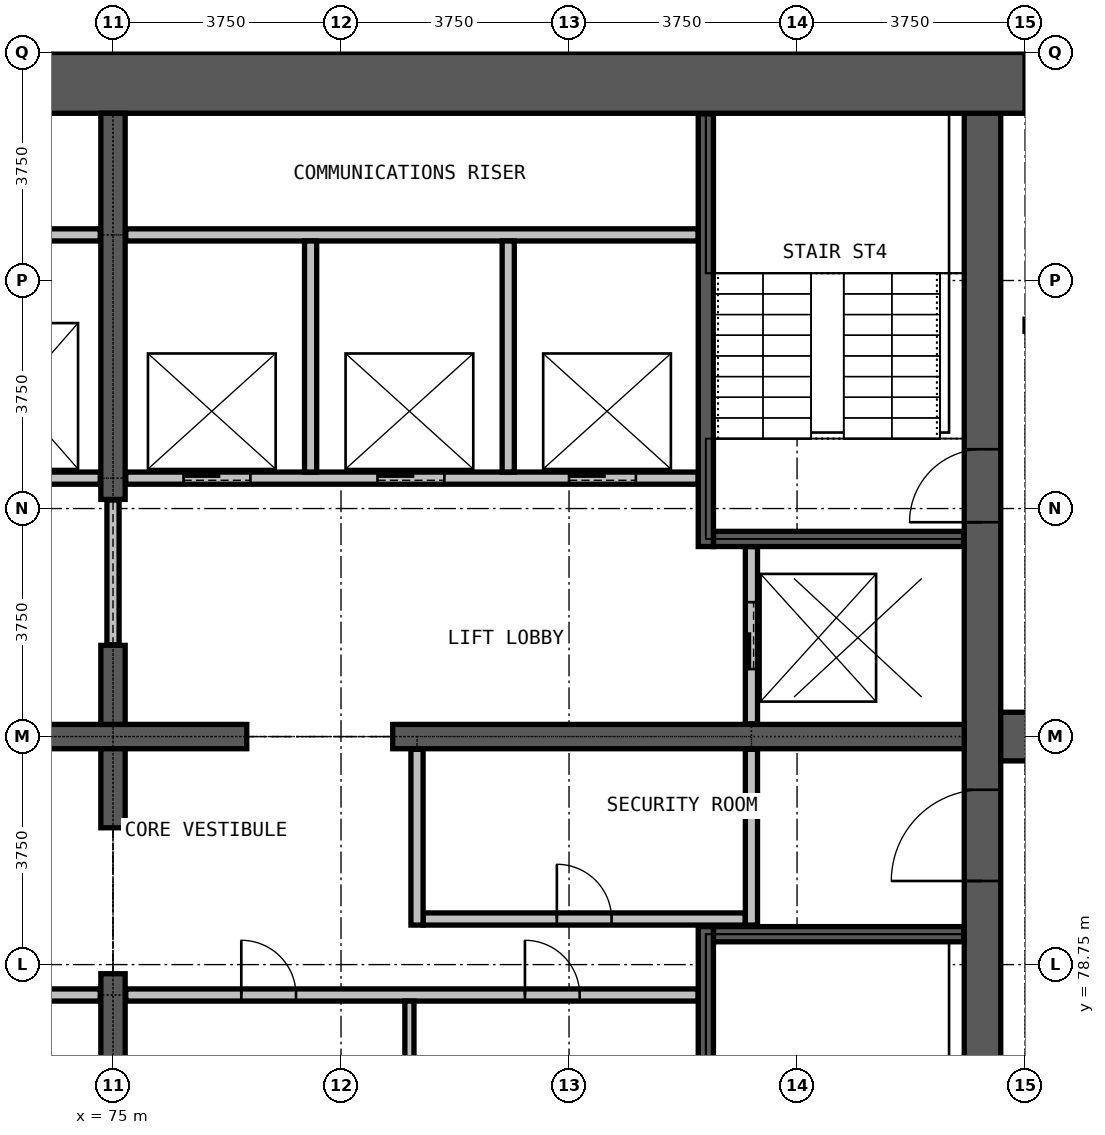
"""IFC4 building model, lengths in metres.
Left out: names, types, materials, properties, quantities, classifications, styles, units other than length and angle.
Written with IfcOpenShell. Run it as: python <this file> out.ifc"""

import sys

from ifc_helpers import new_model, si_unit, direction, frame, frame_2d, origin, place, context, subcontext, project, spatial, rectangle, extrude, element, fill, save


model = new_model("IFC4")
c1 = context("Model", 3, precision=1e-05, world=origin(), true_north=direction((0.0, 1.0)))
c2 = subcontext(c1, "Body", "Model", "MODEL_VIEW")
j1 = project(units=[si_unit("LENGTHUNIT", "METRE"), si_unit("PLANEANGLEUNIT", "RADIAN")], contexts=[c1])
p1 = place(None, origin())
s1 = spatial("IfcSite", under=j1, at=p1, CompositionType="ELEMENT")
p2 = place(p1, origin())
s2 = spatial("IfcBuilding", under=s1, at=p2, CompositionType="ELEMENT")
p3 = place(p2, frame((0.0, 0.0, 183.7)))
s3 = spatial("IfcBuildingStorey", under=s2, at=p3, CompositionType="ELEMENT", Elevation=183.7)
p4 = place(p3, frame((89.3, 72.25, 0.0), z_axis=(0.0, 0.0, 1.0), x_axis=(0.0, 1.0, 0.0)))
e1 = element("IfcWall", 1, at=p4, inside=s3, PredefinedType="SHEAR", context=c2, shape_type="SweptSolid", body=[
    extrude(rectangle(XDim=20.5, YDim=0.6, at=frame_2d((10.25, 0.0))), origin(), (0.0, 0.0, 1.0), 5.0),
])
p5 = place(p4, frame((0.275, 0.0, 0.0)))
e2 = element("IfcOpeningElement", 2, at=p5, cuts=e1, PredefinedType="OPENING", context=c2, shape_type="SweptSolid", body=[
    extrude(rectangle(XDim=1.2, YDim=2.2, at=frame_2d((0.6, 1.1))), frame((0.0, 0.31, 0.0), z_axis=(0.0, -1.0, 0.0), x_axis=(1.0, 0.0, 0.0)), (0.0, 0.0, 1.0), 0.62),
])
p6 = place(p4, frame((13.775, 0.0, 0.0)))
e3 = element("IfcOpeningElement", 3, at=p6, cuts=e1, PredefinedType="OPENING", context=c2, shape_type="SweptSolid", body=[
    extrude(rectangle(XDim=1.2, YDim=2.2, at=frame_2d((0.6, 1.1))), frame((0.0, 0.31, 0.0), z_axis=(0.0, -1.0, 0.0), x_axis=(1.0, 0.0, 0.0)), (0.0, 0.0, 1.0), 0.62),
])
p7 = place(p4, frame((7.875, 0.0, 0.0)))
e4 = element("IfcOpeningElement", 4, at=p7, cuts=e1, PredefinedType="OPENING", context=c2, shape_type="SweptSolid", body=[
    extrude(rectangle(XDim=1.5, YDim=2.2, at=frame_2d((0.75, 1.1))), frame((0.0, 0.31, 0.0), z_axis=(0.0, -1.0, 0.0), x_axis=(1.0, 0.0, 0.0)), (0.0, 0.0, 1.0), 0.62),
])
p8 = place(p3, frame((90.0, 93.25, 0.0), z_axis=(0.0, 0.0, 1.0), x_axis=(-1.0, 0.0, 0.0)))
e5 = element("IfcWall", 5, at=p8, inside=s3, PredefinedType="SHEAR", context=c2, shape_type="SweptSolid", body=[
    extrude(rectangle(XDim=30.0, YDim=1.0, at=frame_2d((15.0, 0.0))), origin(), (0.0, 0.0, 1.0), 5.0),
])
p9 = place(p3, frame((72.8, 82.5, 0.0), z_axis=(0.0, 0.0, 1.0), x_axis=(1.0, 0.0, 0.0)))
e6 = element("IfcWall", 6, at=p9, inside=s3, PredefinedType="SHEAR", context=c2, shape_type="SweptSolid", body=[
    extrude(rectangle(XDim=4.4, YDim=0.4, at=frame_2d((2.2, 0.0))), origin(), (0.0, 0.0, 1.0), 5.0),
])
p10 = place(p3, frame((79.6, 82.5, 0.0), z_axis=(0.0, 0.0, 1.0), x_axis=(1.0, 0.0, 0.0)))
e7 = element("IfcWall", 7, at=p10, inside=s3, PredefinedType="SHEAR", context=c2, shape_type="SweptSolid", body=[
    extrude(rectangle(XDim=9.4, YDim=0.4, at=frame_2d((4.7, 0.0))), origin(), (0.0, 0.0, 1.0), 5.0),
])
p11 = place(p3, frame((75.0, 72.25, 0.0), z_axis=(0.0, 0.0, 1.0), x_axis=(0.0, 1.0, 0.0)))
e8 = element("IfcWall", 8, at=p11, inside=s3, PredefinedType="SHEAR", context=c2, shape_type="SweptSolid", body=[
    extrude(rectangle(XDim=6.35, YDim=0.4, at=frame_2d((3.175, 0.0))), origin(), (0.0, 0.0, 1.0), 5.0),
])
for number, where, z_axis, x_axis in (
    (9, (75.0, 81.0, 0.0), (0.0, 0.0, 1.0), (0.0, 1.0, 0.0)),
    (10, (75.0, 82.7, 0.0), (0.0, 0.0, 1.0), (0.0, 1.0, 0.0)),
):
    element("IfcWall", number, at=place(p3, frame(where, z_axis=z_axis, x_axis=x_axis)), inside=s3, PredefinedType="SHEAR", context=c2, shape_type="SweptSolid", body=[
        extrude(rectangle(XDim=1.3, YDim=0.4, at=frame_2d((0.65, 0.0))), origin(), (0.0, 0.0, 1.0), 5.0),
    ])
p12 = place(p3, frame((75.0, 86.4, 0.0), z_axis=(0.0, 0.0, 1.0), x_axis=(0.0, 1.0, 0.0)))
e11 = element("IfcWall", 11, at=p12, inside=s3, PredefinedType="SHEAR", context=c2, shape_type="SweptSolid", body=[
    extrude(rectangle(XDim=6.35, YDim=0.4, at=frame_2d((3.175, 0.0))), origin(), (0.0, 0.0, 1.0), 5.0),
])
p13 = place(p3, frame((89.6, 82.5, 0.0), z_axis=(0.0, 0.0, 1.0), x_axis=(1.0, 0.0, 0.0)))
e12 = element("IfcWall", 12, at=p13, inside=s3, PredefinedType="SHEAR", context=c2, shape_type="SweptSolid", body=[
    extrude(rectangle(XDim=2.5, YDim=0.8, at=frame_2d((1.25, 0.0))), origin(), (0.0, 0.0, 1.0), 4.7),
])
p14 = place(p3, frame((65.375, 78.25, 0.0), z_axis=(0.0, 0.0, 1.0), x_axis=(1.0, 0.0, 0.0)))
e13 = element("IfcWall", 13, at=p14, inside=s3, PredefinedType="PARTITIONING", context=c2, shape_type="SweptSolid", body=[
    extrude(rectangle(XDim=9.415, YDim=0.2, at=frame_2d((4.708, 0.0))), origin(), (0.0, 0.0, 1.0), 4.7),
])
p15 = place(p14, frame((1.0, 0.0, 0.0)))
e14 = element("IfcOpeningElement", 14, at=p15, cuts=e13, PredefinedType="OPENING", context=c2, shape_type="SweptSolid", body=[
    extrude(rectangle(XDim=0.9, YDim=2.2, at=frame_2d((0.45, 1.1))), frame((0.0, 0.11, 0.0), z_axis=(0.0, -1.0, 0.0), x_axis=(1.0, 0.0, 0.0)), (0.0, 0.0, 1.0), 0.22),
])
p16 = place(p14, frame((5.665, 0.0, 0.0)))
e15 = element("IfcOpeningElement", 15, at=p16, cuts=e13, PredefinedType="OPENING", context=c2, shape_type="SweptSolid", body=[
    extrude(rectangle(XDim=0.9, YDim=2.2, at=frame_2d((0.45, 1.1))), frame((0.0, 0.11, 0.0), z_axis=(0.0, -1.0, 0.0), x_axis=(1.0, 0.0, 0.0)), (0.0, 0.0, 1.0), 0.22),
])
p17 = place(p3, frame((75.21, 78.25, 0.0), z_axis=(0.0, 0.0, 1.0), x_axis=(1.0, 0.0, 0.0)))
e16 = element("IfcWall", 16, at=p17, inside=s3, PredefinedType="PARTITIONING", context=c2, shape_type="SweptSolid", body=[
    extrude(rectangle(XDim=9.415, YDim=0.2, at=frame_2d((4.708, 0.0))), origin(), (0.0, 0.0, 1.0), 4.7),
])
p18 = place(p17, frame((1.9, 0.0, 0.0)))
e17 = element("IfcOpeningElement", 17, at=p18, cuts=e16, PredefinedType="OPENING", context=c2, shape_type="SweptSolid", body=[
    extrude(rectangle(XDim=0.9, YDim=2.2, at=frame_2d((0.45, 1.1))), frame((0.0, 0.11, 0.0), z_axis=(0.0, -1.0, 0.0), x_axis=(1.0, 0.0, 0.0)), (0.0, 0.0, 1.0), 0.22),
])
p19 = place(p17, frame((6.565, 0.0, 0.0)))
e18 = element("IfcOpeningElement", 18, at=p19, cuts=e16, PredefinedType="OPENING", context=c2, shape_type="SweptSolid", body=[
    extrude(rectangle(XDim=0.9, YDim=2.2, at=frame_2d((0.45, 1.1))), frame((0.0, 0.11, 0.0), z_axis=(0.0, -1.0, 0.0), x_axis=(1.0, 0.0, 0.0)), (0.0, 0.0, 1.0), 0.22),
])
p20 = place(p3, frame((80.1, 79.5, 0.0), z_axis=(0.0, 0.0, 1.0), x_axis=(1.0, 0.0, 0.0)))
e19 = element("IfcWall", 19, at=p20, inside=s3, PredefinedType="PARTITIONING", context=c2, shape_type="SweptSolid", body=[
    extrude(rectangle(XDim=5.3, YDim=0.2, at=frame_2d((2.65, 0.0))), origin(), (0.0, 0.0, 1.0), 4.7),
])
p21 = place(p20, frame((2.2, 0.0, 0.0)))
e20 = element("IfcOpeningElement", 20, at=p21, cuts=e19, PredefinedType="OPENING", context=c2, shape_type="SweptSolid", body=[
    extrude(rectangle(XDim=0.9, YDim=2.2, at=frame_2d((0.45, 1.1))), frame((0.0, 0.11, 0.0), z_axis=(0.0, -1.0, 0.0), x_axis=(1.0, 0.0, 0.0)), (0.0, 0.0, 1.0), 0.22),
])
p22 = place(p3, frame((75.0, 84.01, 0.0), z_axis=(0.0, 0.0, 1.0), x_axis=(0.0, 1.0, 0.0)))
e21 = element("IfcWall", 21, at=p22, inside=s3, PredefinedType="PARTITIONING", context=c2, shape_type="SweptSolid", body=[
    extrude(rectangle(XDim=2.38, YDim=0.2, at=frame_2d((1.19, 0.0))), origin(), (0.0, 0.0, 1.0), 2.4),
])
for number, where, z_axis, x_axis in (
    (22, (80.0, 79.4, 0.0), (0.0, 0.0, 1.0), (0.0, 1.0, 0.0)),
    (23, (85.5, 79.4, 0.0), (0.0, 0.0, 1.0), (0.0, 1.0, 0.0)),
):
    element("IfcWall", number, at=place(p3, frame(where, z_axis=z_axis, x_axis=x_axis)), inside=s3, PredefinedType="PARTITIONING", context=c2, shape_type="SweptSolid", body=[
        extrude(rectangle(XDim=2.89, YDim=0.2, at=frame_2d((1.445, 0.0))), origin(), (0.0, 0.0, 1.0), 4.7),
    ])
p23 = place(p3, frame((79.875, 74.35, 0.0), z_axis=(0.0, 0.0, 1.0), x_axis=(0.0, 1.0, 0.0)))
e24 = element("IfcWall", 24, at=p23, inside=s3, PredefinedType="PARTITIONING", context=c2, shape_type="SweptSolid", body=[
    extrude(rectangle(XDim=3.8, YDim=0.15, at=frame_2d((1.9, 0.0))), origin(), (0.0, 0.0, 1.0), 4.7),
])
p24 = place(p3, frame((65.375, 86.75, 0.0), z_axis=(0.0, 0.0, 1.0), x_axis=(1.0, 0.0, 0.0)))
e25 = element("IfcWall", 25, at=p24, inside=s3, PredefinedType="PARTITIONING", context=c2, shape_type="SweptSolid", body=[
    extrude(rectangle(XDim=9.415, YDim=0.2, at=frame_2d((4.708, 0.0))), origin(), (0.0, 0.0, 1.0), 4.7),
])
p25 = place(p24, frame((1.0, 0.0, 0.0)))
e26 = element("IfcOpeningElement", 26, at=p25, cuts=e25, PredefinedType="OPENING", context=c2, shape_type="SweptSolid", body=[
    extrude(rectangle(XDim=1.1, YDim=2.2, at=frame_2d((0.55, 1.1))), frame((0.0, 0.11, 0.0), z_axis=(0.0, -1.0, 0.0), x_axis=(1.0, 0.0, 0.0)), (0.0, 0.0, 1.0), 0.22),
])
p26 = place(p24, frame((4.175, 0.0, 0.0)))
e27 = element("IfcOpeningElement", 27, at=p26, cuts=e25, PredefinedType="OPENING", context=c2, shape_type="SweptSolid", body=[
    extrude(rectangle(XDim=1.1, YDim=2.2, at=frame_2d((0.55, 1.1))), frame((0.0, 0.11, 0.0), z_axis=(0.0, -1.0, 0.0), x_axis=(1.0, 0.0, 0.0)), (0.0, 0.0, 1.0), 0.22),
])
p27 = place(p24, frame((7.325, 0.0, 0.0)))
e28 = element("IfcOpeningElement", 28, at=p27, cuts=e25, PredefinedType="OPENING", context=c2, shape_type="SweptSolid", body=[
    extrude(rectangle(XDim=1.1, YDim=2.2, at=frame_2d((0.55, 1.1))), frame((0.0, 0.11, 0.0), z_axis=(0.0, -1.0, 0.0), x_axis=(1.0, 0.0, 0.0)), (0.0, 0.0, 1.0), 0.22),
])
p28 = place(p3, frame((75.21, 86.75, 0.0), z_axis=(0.0, 0.0, 1.0), x_axis=(1.0, 0.0, 0.0)))
e29 = element("IfcWall", 29, at=p28, inside=s3, PredefinedType="PARTITIONING", context=c2, shape_type="SweptSolid", body=[
    extrude(rectangle(XDim=9.415, YDim=0.2, at=frame_2d((4.708, 0.0))), origin(), (0.0, 0.0, 1.0), 4.7),
])
p29 = place(p28, frame((0.95, 0.0, 0.0)))
e30 = element("IfcOpeningElement", 30, at=p29, cuts=e29, PredefinedType="OPENING", context=c2, shape_type="SweptSolid", body=[
    extrude(rectangle(XDim=1.1, YDim=2.2, at=frame_2d((0.55, 1.1))), frame((0.0, 0.11, 0.0), z_axis=(0.0, -1.0, 0.0), x_axis=(1.0, 0.0, 0.0)), (0.0, 0.0, 1.0), 0.22),
])
p30 = place(p28, frame((4.14, 0.0, 0.0)))
e31 = element("IfcOpeningElement", 31, at=p30, cuts=e29, PredefinedType="OPENING", context=c2, shape_type="SweptSolid", body=[
    extrude(rectangle(XDim=1.1, YDim=2.2, at=frame_2d((0.55, 1.1))), frame((0.0, 0.11, 0.0), z_axis=(0.0, -1.0, 0.0), x_axis=(1.0, 0.0, 0.0)), (0.0, 0.0, 1.0), 0.22),
])
p31 = place(p28, frame((7.29, 0.0, 0.0)))
e32 = element("IfcOpeningElement", 32, at=p31, cuts=e29, PredefinedType="OPENING", context=c2, shape_type="SweptSolid", body=[
    extrude(rectangle(XDim=1.1, YDim=2.2, at=frame_2d((0.55, 1.1))), frame((0.0, 0.11, 0.0), z_axis=(0.0, -1.0, 0.0), x_axis=(1.0, 0.0, 0.0)), (0.0, 0.0, 1.0), 0.22),
])
for number, where, z_axis, x_axis in (
    (33, (65.375, 90.75, 0.0), (0.0, 0.0, 1.0), (1.0, 0.0, 0.0)),
    (34, (75.21, 90.75, 0.0), (0.0, 0.0, 1.0), (1.0, 0.0, 0.0)),
):
    element("IfcWall", number, at=place(p3, frame(where, z_axis=z_axis, x_axis=x_axis)), inside=s3, PredefinedType="PARTITIONING", context=c2, shape_type="SweptSolid", body=[
        extrude(rectangle(XDim=9.415, YDim=0.2, at=frame_2d((4.708, 0.0))), origin(), (0.0, 0.0, 1.0), 4.7),
    ])
for number, where, z_axis, x_axis in (
    (35, (78.25, 86.85, 0.0), (0.0, 0.0, 1.0), (0.0, 1.0, 0.0)),
    (36, (81.5, 86.85, 0.0), (0.0, 0.0, 1.0), (0.0, 1.0, 0.0)),
):
    element("IfcWall", number, at=place(p3, frame(where, z_axis=z_axis, x_axis=x_axis)), inside=s3, PredefinedType="PARTITIONING", context=c2, shape_type="SweptSolid", body=[
        extrude(rectangle(XDim=3.8, YDim=0.2, at=frame_2d((1.9, 0.0))), origin(), (0.0, 0.0, 1.0), 4.7),
    ])
p32 = place(p3, frame((85.5, 82.71, 0.0), z_axis=(0.0, 0.0, 1.0), x_axis=(0.0, 1.0, 0.0)))
e37 = element("IfcWall", 37, at=p32, inside=s3, PredefinedType="PARTITIONING", context=c2, shape_type="SweptSolid", body=[
    extrude(rectangle(XDim=2.915, YDim=0.2, at=frame_2d((1.458, 0.0))), origin(), (0.0, 0.0, 1.0), 4.7),
])
p33 = place(p32, frame((0.9, 0.0, 0.0)))
e38 = element("IfcOpeningElement", 38, at=p33, cuts=e37, PredefinedType="OPENING", context=c2, shape_type="SweptSolid", body=[
    extrude(rectangle(XDim=1.1, YDim=2.2, at=frame_2d((0.55, 1.1))), frame((0.0, 0.11, 0.0), z_axis=(0.0, -1.0, 0.0), x_axis=(1.0, 0.0, 0.0)), (0.0, 0.0, 1.0), 0.22),
])
for number, where, z_axis, x_axis in (
    (39, (84.875, 79.25, 0.0), (0.0, 0.0, 1.0), (1.0, 0.0, 0.0)),
    (40, (84.875, 85.75, 0.0), (0.0, 0.0, 1.0), (1.0, 0.0, 0.0)),
):
    element("IfcWall", number, at=place(p3, frame(where, z_axis=z_axis, x_axis=x_axis)), inside=s3, PredefinedType="PARTITIONING", context=c2, shape_type="SweptSolid", body=[
        extrude(rectangle(XDim=4.115, YDim=0.25, at=frame_2d((2.058, 0.0))), origin(), (0.0, 0.0, 1.0), 4.7),
    ])
for number, where, z_axis, x_axis in (
    (41, (84.75, 72.26, 0.0), (0.0, 0.0, 1.0), (0.0, 1.0, 0.0)),
    (42, (84.75, 85.625, 0.0), (0.0, 0.0, 1.0), (0.0, 1.0, 0.0)),
):
    element("IfcWall", number, at=place(p3, frame(where, z_axis=z_axis, x_axis=x_axis)), inside=s3, PredefinedType="PARTITIONING", context=c2, shape_type="SweptSolid", body=[
        extrude(rectangle(XDim=7.115, YDim=0.25, at=frame_2d((3.558, 0.0))), origin(), (0.0, 0.0, 1.0), 4.7),
    ])
p34 = place(p29, origin())
e43 = element("IfcDoor", 43, at=p34, inside=s3, OperationType="DOUBLE_DOOR_SLIDING", PredefinedType="DOOR", context=c2, shape_type="SweptSolid", body=[
    extrude(rectangle(XDim=1.1, YDim=2.2, at=frame_2d((0.55, 1.1))), frame((0.0, 0.025, 0.0), z_axis=(0.0, -1.0, 0.0), x_axis=(1.0, 0.0, 0.0)), (0.0, 0.0, 1.0), 0.05),
])
fill(e30, e43)
p35 = place(p30, origin())
e44 = element("IfcDoor", 44, at=p35, inside=s3, OperationType="DOUBLE_DOOR_SLIDING", PredefinedType="DOOR", context=c2, shape_type="SweptSolid", body=[
    extrude(rectangle(XDim=1.1, YDim=2.2, at=frame_2d((0.55, 1.1))), frame((0.0, 0.025, 0.0), z_axis=(0.0, -1.0, 0.0), x_axis=(1.0, 0.0, 0.0)), (0.0, 0.0, 1.0), 0.05),
])
fill(e31, e44)
p36 = place(p31, origin())
e45 = element("IfcDoor", 45, at=p36, inside=s3, OperationType="DOUBLE_DOOR_SLIDING", PredefinedType="DOOR", context=c2, shape_type="SweptSolid", body=[
    extrude(rectangle(XDim=1.1, YDim=2.2, at=frame_2d((0.55, 1.1))), frame((0.0, 0.025, 0.0), z_axis=(0.0, -1.0, 0.0), x_axis=(1.0, 0.0, 0.0)), (0.0, 0.0, 1.0), 0.05),
])
fill(e32, e45)
p37 = place(p33, origin())
e46 = element("IfcDoor", 46, at=p37, inside=s3, OperationType="DOUBLE_DOOR_SLIDING", PredefinedType="DOOR", context=c2, shape_type="SweptSolid", body=[
    extrude(rectangle(XDim=1.1, YDim=2.2, at=frame_2d((0.55, 1.1))), frame((0.0, 0.025, 0.0), z_axis=(0.0, -1.0, 0.0), x_axis=(1.0, 0.0, 0.0)), (0.0, 0.0, 1.0), 0.05),
])
fill(e38, e46)
p38 = place(p6, origin())
e47 = element("IfcDoor", 47, at=p38, inside=s3, OperationType="SINGLE_SWING_RIGHT", PredefinedType="DOOR", context=c2, shape_type="SweptSolid", body=[
    extrude(rectangle(XDim=1.2, YDim=2.2, at=frame_2d((0.6, 1.1))), frame((0.0, 0.025, 0.0), z_axis=(0.0, -1.0, 0.0), x_axis=(1.0, 0.0, 0.0)), (0.0, 0.0, 1.0), 0.05),
])
fill(e3, e47)
p39 = place(p7, origin())
e48 = element("IfcDoor", 48, at=p39, inside=s3, OperationType="DOUBLE_DOOR_SINGLE_SWING", PredefinedType="DOOR", context=c2, shape_type="SweptSolid", body=[
    extrude(rectangle(XDim=1.5, YDim=2.2, at=frame_2d((0.75, 1.1))), frame((0.0, 0.025, 0.0), z_axis=(0.0, -1.0, 0.0), x_axis=(1.0, 0.0, 0.0)), (0.0, 0.0, 1.0), 0.05),
])
fill(e4, e48)
p40 = place(p21, origin())
e49 = element("IfcDoor", 49, at=p40, inside=s3, OperationType="SINGLE_SWING_LEFT", PredefinedType="DOOR", context=c2, shape_type="SweptSolid", body=[
    extrude(rectangle(XDim=0.9, YDim=2.2, at=frame_2d((0.45, 1.1))), frame((0.0, 0.025, 0.0), z_axis=(0.0, -1.0, 0.0), x_axis=(1.0, 0.0, 0.0)), (0.0, 0.0, 1.0), 0.05),
])
fill(e20, e49)
p41 = place(p18, origin())
e50 = element("IfcDoor", 50, at=p41, inside=s3, OperationType="SINGLE_SWING_LEFT", PredefinedType="DOOR", context=c2, shape_type="SweptSolid", body=[
    extrude(rectangle(XDim=0.9, YDim=2.2, at=frame_2d((0.45, 1.1))), frame((0.0, 0.025, 0.0), z_axis=(0.0, -1.0, 0.0), x_axis=(1.0, 0.0, 0.0)), (0.0, 0.0, 1.0), 0.05),
])
fill(e17, e50)
p42 = place(p19, origin())
e51 = element("IfcDoor", 51, at=p42, inside=s3, OperationType="SINGLE_SWING_LEFT", PredefinedType="DOOR", context=c2, shape_type="SweptSolid", body=[
    extrude(rectangle(XDim=0.9, YDim=2.2, at=frame_2d((0.45, 1.1))), frame((0.0, 0.025, 0.0), z_axis=(0.0, -1.0, 0.0), x_axis=(1.0, 0.0, 0.0)), (0.0, 0.0, 1.0), 0.05),
])
fill(e18, e51)
save(model, sys.argv[1])
